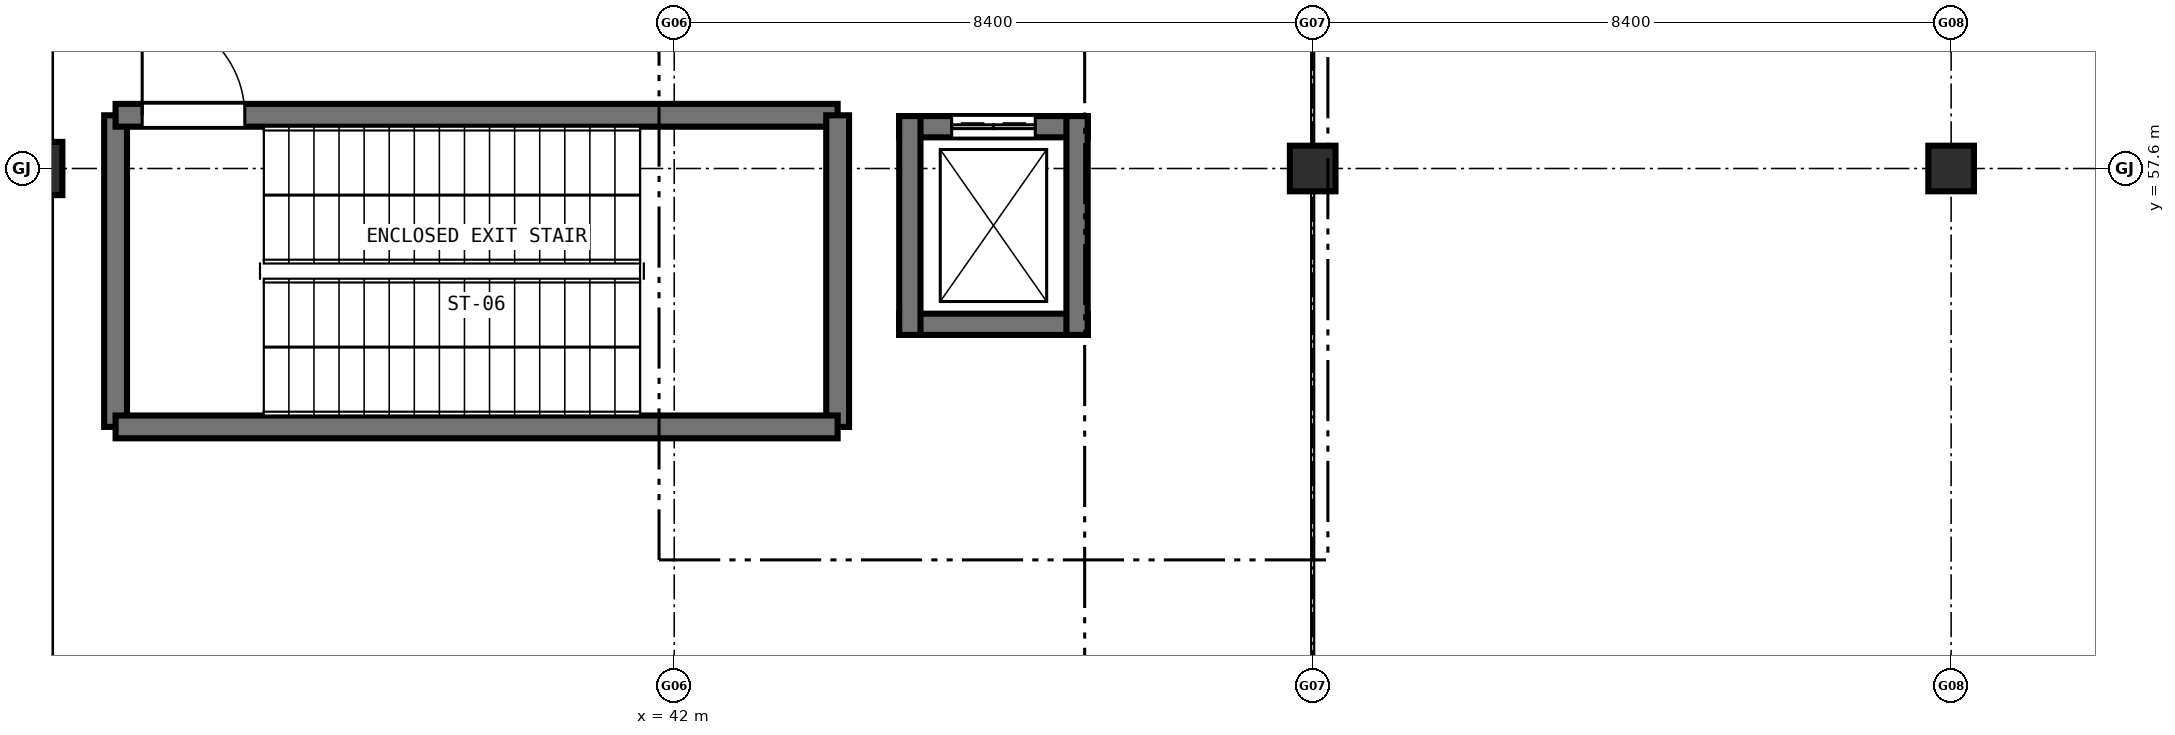
"""IFC4 building model, lengths in metres.
Left out: names, types, materials, properties, quantities, classifications, styles, units other than length and angle.
Written with IfcOpenShell. Run it as: python <this file> out.ifc"""

import sys

from ifc_helpers import new_model, si_unit, direction, frame, frame_2d, origin, origin_2d, place, context, subcontext, project, spatial, rectangle, extrude, element, fill, save


model = new_model("IFC4")
c1 = context("Model", 3, precision=1e-05, world=origin(), true_north=direction((0.0, 1.0)))
c2 = subcontext(c1, "Body", "Model", "MODEL_VIEW")
j1 = project(units=[si_unit("LENGTHUNIT", "METRE"), si_unit("PLANEANGLEUNIT", "RADIAN")], contexts=[c1])
p1 = place(None, origin())
s1 = spatial("IfcSite", under=j1, at=p1, CompositionType="ELEMENT")
p2 = place(p1, origin())
s2 = spatial("IfcBuilding", under=s1, at=p2, CompositionType="ELEMENT")
p3 = place(p2, frame((0.0, 0.0, -4.8)))
s3 = spatial("IfcBuildingStorey", under=s2, at=p3, CompositionType="ELEMENT", Elevation=-4.8)
p4 = place(p3, frame((33.6, 57.6, 0.0), z_axis=(0.0, 0.0, 1.0), x_axis=(1.0, 0.0, 0.0)))
e1 = element("IfcColumn", 1, at=p4, inside=s3, PredefinedType="COLUMN", context=c2, shape_type="SweptSolid", body=[
    extrude(rectangle(XDim=0.7, YDim=0.7, at=origin_2d()), origin(), (0.0, 0.0, 1.0), 4.8),
])
for number, where, z_axis, x_axis in (
    (2, (50.4, 57.6, 0.0), (0.0, 0.0, 1.0), (1.0, 0.0, 0.0)),
    (3, (58.8, 57.6, 0.0), (0.0, 0.0, 1.0), (1.0, 0.0, 0.0)),
):
    element("IfcColumn", number, at=place(p3, frame(where, z_axis=z_axis, x_axis=x_axis)), inside=s3, PredefinedType="COLUMN", context=c2, shape_type="SweptSolid", body=[
        extrude(rectangle(XDim=0.6, YDim=0.6, at=origin_2d()), origin(), (0.0, 0.0, 1.0), 4.8),
    ])
p5 = place(p3, frame((34.65, 54.2, 0.0), z_axis=(0.0, 0.0, 1.0), x_axis=(0.0, 1.0, 0.0)))
e4 = element("IfcWall", 4, at=p5, inside=s3, PredefinedType="SHEAR", context=c2, shape_type="SweptSolid", body=[
    extrude(rectangle(XDim=4.1, YDim=0.3, at=frame_2d((2.05, 0.0))), origin(), (0.0, 0.0, 1.0), 4.5),
])
p6 = place(p3, frame((34.65, 58.3, 0.0), z_axis=(0.0, 0.0, 1.0), x_axis=(1.0, 0.0, 0.0)))
e5 = element("IfcWall", 5, at=p6, inside=s3, PredefinedType="SHEAR", context=c2, shape_type="SweptSolid", body=[
    extrude(rectangle(XDim=9.5, YDim=0.3, at=frame_2d((4.75, 0.0))), origin(), (0.0, 0.0, 1.0), 4.5),
])
p7 = place(p6, frame((0.35, 0.0, 0.0)))
e6 = element("IfcOpeningElement", 6, at=p7, cuts=e5, PredefinedType="OPENING", context=c2, shape_type="SweptSolid", body=[
    extrude(rectangle(XDim=1.35, YDim=2.2, at=frame_2d((0.675, 1.1))), frame((0.0, 0.16, 0.0), z_axis=(0.0, -1.0, 0.0), x_axis=(1.0, 0.0, 0.0)), (0.0, 0.0, 1.0), 0.32),
])
p8 = place(p3, frame((44.15, 58.3, 0.0), z_axis=(0.0, 0.0, 1.0), x_axis=(0.0, -1.0, 0.0)))
e7 = element("IfcWall", 7, at=p8, inside=s3, PredefinedType="SHEAR", context=c2, shape_type="SweptSolid", body=[
    extrude(rectangle(XDim=4.1, YDim=0.3, at=frame_2d((2.05, 0.0))), origin(), (0.0, 0.0, 1.0), 4.5),
])
p9 = place(p3, frame((44.15, 54.2, 0.0), z_axis=(0.0, 0.0, 1.0), x_axis=(-1.0, 0.0, 0.0)))
e8 = element("IfcWall", 8, at=p9, inside=s3, PredefinedType="SHEAR", context=c2, shape_type="SweptSolid", body=[
    extrude(rectangle(XDim=9.5, YDim=0.3, at=frame_2d((4.75, 0.0))), origin(), (0.0, 0.0, 1.0), 4.5),
])
p10 = place(p3, frame((47.44, 55.55, 0.0), z_axis=(0.0, 0.0, 1.0), x_axis=(-1.0, 0.0, 0.0)))
e9 = element("IfcWall", 9, at=p10, inside=s3, PredefinedType="SHEAR", context=c2, shape_type="SweptSolid", body=[
    extrude(rectangle(XDim=2.48, YDim=0.28, at=frame_2d((1.24, 0.0))), origin(), (0.0, 0.0, 1.0), 4.5),
])
p11 = place(p3, frame((44.96, 58.15, 0.0), z_axis=(0.0, 0.0, 1.0), x_axis=(1.0, 0.0, 0.0)))
e10 = element("IfcWall", 10, at=p11, inside=s3, PredefinedType="SHEAR", context=c2, shape_type="SweptSolid", body=[
    extrude(rectangle(XDim=2.48, YDim=0.28, at=frame_2d((1.24, 0.0))), origin(), (0.0, 0.0, 1.0), 4.5),
])
p12 = place(p11, frame((0.69, 0.0, 0.0)))
e11 = element("IfcOpeningElement", 11, at=p12, cuts=e10, PredefinedType="OPENING", context=c2, shape_type="SweptSolid", body=[
    extrude(rectangle(XDim=1.1, YDim=2.15, at=frame_2d((0.55, 1.075))), frame((0.0, 0.15, 0.0), z_axis=(0.0, -1.0, 0.0), x_axis=(1.0, 0.0, 0.0)), (0.0, 0.0, 1.0), 0.3),
])
for number, where, z_axis, x_axis in (
    (12, (45.1, 55.41, 0.0), (0.0, 0.0, 1.0), (0.0, 1.0, 0.0)),
    (13, (47.3, 58.29, 0.0), (0.0, 0.0, 1.0), (0.0, -1.0, 0.0)),
):
    element("IfcWall", number, at=place(p3, frame(where, z_axis=z_axis, x_axis=x_axis)), inside=s3, PredefinedType="SHEAR", context=c2, shape_type="SweptSolid", body=[
        extrude(rectangle(XDim=2.88, YDim=0.28, at=frame_2d((1.44, 0.0))), origin(), (0.0, 0.0, 1.0), 4.5),
    ])
p13 = place(p7, origin())
e14 = element("IfcDoor", 14, at=p13, inside=s3, OperationType="SINGLE_SWING_LEFT", PredefinedType="DOOR", context=c2, shape_type="SweptSolid", body=[
    extrude(rectangle(XDim=1.35, YDim=2.2, at=frame_2d((0.675, 1.1))), frame((0.0, 0.025, 0.0), z_axis=(0.0, -1.0, 0.0), x_axis=(1.0, 0.0, 0.0)), (0.0, 0.0, 1.0), 0.05),
])
fill(e6, e14)
p14 = place(p12, origin())
e15 = element("IfcDoor", 15, at=p14, inside=s3, OperationType="DOUBLE_DOOR_SLIDING", PredefinedType="DOOR", context=c2, shape_type="SweptSolid", body=[
    extrude(rectangle(XDim=1.1, YDim=2.15, at=frame_2d((0.55, 1.075))), frame((0.0, 0.025, 0.0), z_axis=(0.0, -1.0, 0.0), x_axis=(1.0, 0.0, 0.0)), (0.0, 0.0, 1.0), 0.05),
])
fill(e11, e15)
save(model, sys.argv[1])
